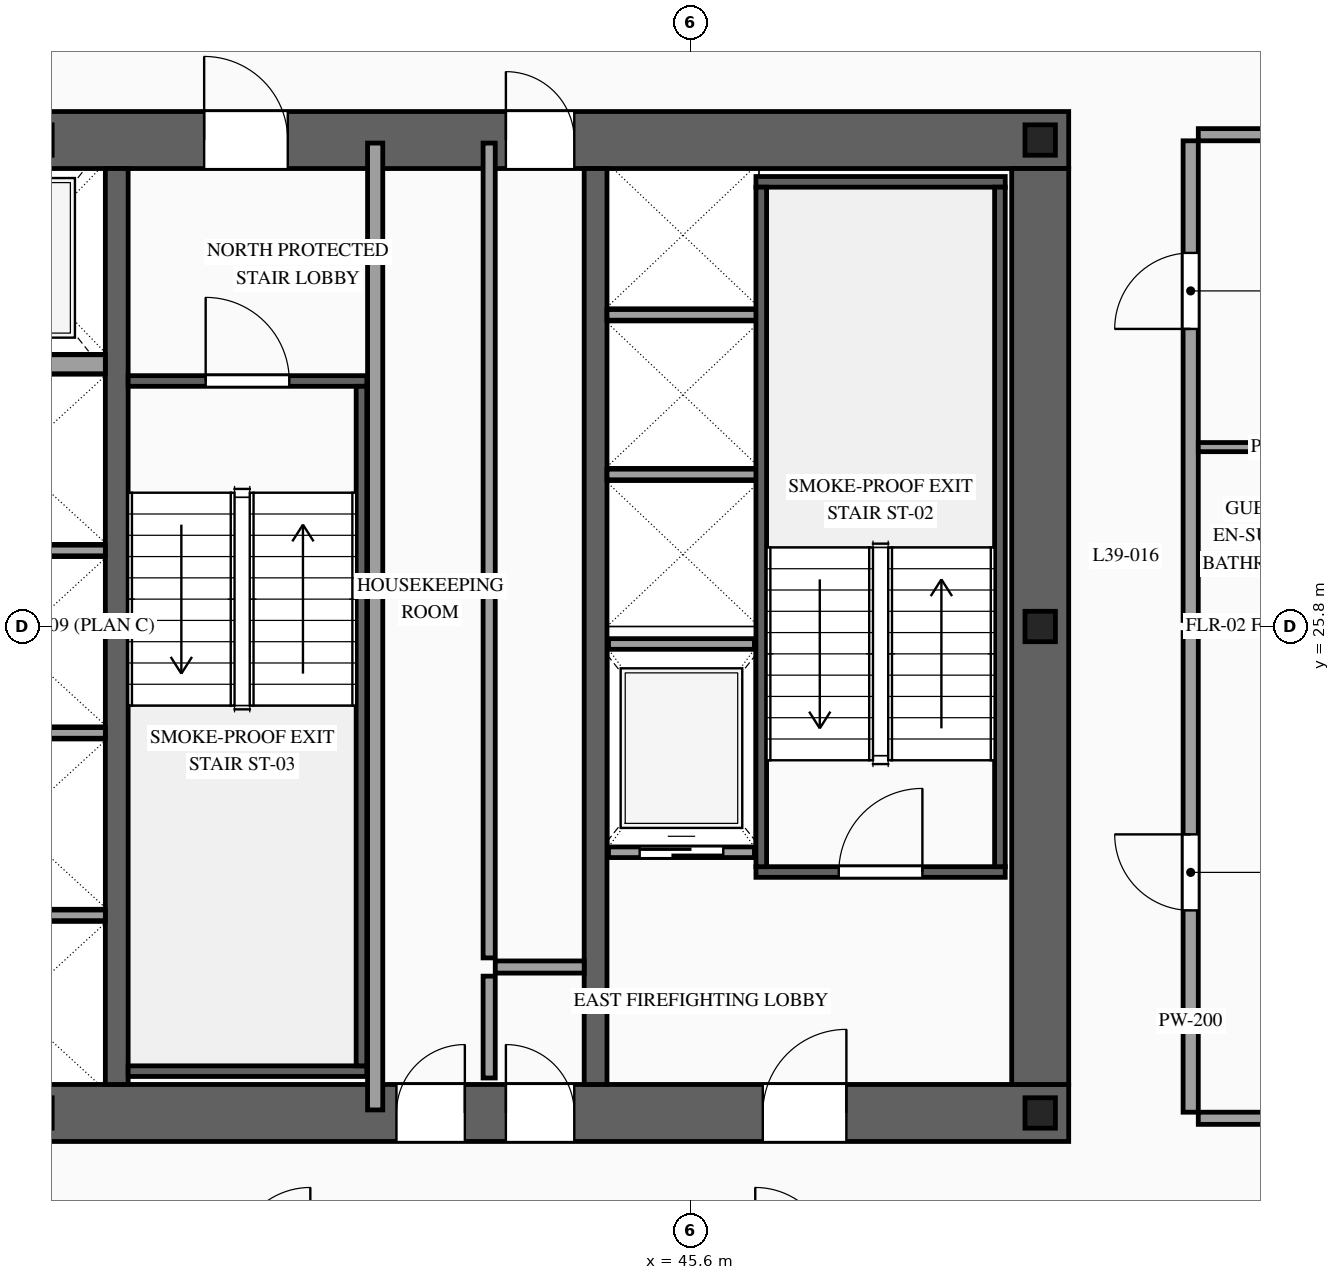
"""IFC4 building model, lengths in metres.
Left out: names, types, materials, properties, quantities, classifications, styles, units other than length and angle.
Written with IfcOpenShell. Run it as: python <this file> out.ifc"""

import sys

from ifc_helpers import new_model, si_unit, direction, frame, frame_2d, origin, origin_2d, place, context, subcontext, project, spatial, rectangle, i_section, extrude, source, transform, mapped, element, fill, save


model = new_model("IFC4")
c1 = context("Model", 3, precision=1e-05, world=origin(), true_north=direction((0.0, 1.0)))
c2 = subcontext(c1, "Body", "Model", "MODEL_VIEW")
j1 = project(units=[si_unit("LENGTHUNIT", "METRE"), si_unit("PLANEANGLEUNIT", "RADIAN")], contexts=[c1])
p1 = place(None, origin())
s1 = spatial("IfcSite", under=j1, at=p1, CompositionType="ELEMENT")
p2 = place(p1, origin())
s2 = spatial("IfcBuilding", under=s1, at=p2, CompositionType="ELEMENT")
p3 = place(p2, frame((0.0, 0.0, 148.8)))
s3 = spatial("IfcBuildingStorey", under=s2, at=p3, CompositionType="ELEMENT", Elevation=148.8)
p4 = place(p3, frame((23.425, 19.4, 0.0), z_axis=(0.0, 0.0, 1.0), x_axis=(1.0, 0.0, 0.0)))
e1 = element("IfcWall", 1, at=p4, inside=s3, PredefinedType="SHEAR", context=c2, shape_type="SweptSolid", body=[
    extrude(rectangle(XDim=27.15, YDim=0.75, at=frame_2d((13.575, 0.0))), origin(), (0.0, 0.0, 1.0), 3.6),
])
p5 = place(p4, frame((2.025, 0.0, 0.0)))
e2 = element("IfcOpeningElement", 2, at=p5, cuts=e1, PredefinedType="OPENING", context=c2, shape_type="SweptSolid", body=[
    extrude(rectangle(XDim=1.1, YDim=2.2, at=frame_2d((0.55, 1.1))), frame((0.0, 0.39, 0.0), z_axis=(0.0, -1.0, 0.0), x_axis=(1.0, 0.0, 0.0)), (0.0, 0.0, 1.0), 0.78),
])
p6 = place(p4, frame((9.925, 0.0, 0.0)))
e3 = element("IfcOpeningElement", 3, at=p6, cuts=e1, PredefinedType="OPENING", context=c2, shape_type="SweptSolid", body=[
    extrude(rectangle(XDim=1.1, YDim=2.2, at=frame_2d((0.55, 1.1))), frame((0.0, 0.39, 0.0), z_axis=(0.0, -1.0, 0.0), x_axis=(1.0, 0.0, 0.0)), (0.0, 0.0, 1.0), 0.78),
])
p7 = place(p4, frame((23.125, 0.0, 0.0)))
e4 = element("IfcOpeningElement", 4, at=p7, cuts=e1, PredefinedType="OPENING", context=c2, shape_type="SweptSolid", body=[
    extrude(rectangle(XDim=1.1, YDim=2.2, at=frame_2d((0.55, 1.1))), frame((0.0, 0.39, 0.0), z_axis=(0.0, -1.0, 0.0), x_axis=(1.0, 0.0, 0.0)), (0.0, 0.0, 1.0), 0.78),
])
p8 = place(p4, frame((19.745, 0.0, 0.0)))
e5 = element("IfcOpeningElement", 5, at=p8, cuts=e1, PredefinedType="OPENING", context=c2, shape_type="SweptSolid", body=[
    extrude(rectangle(XDim=0.9, YDim=2.15, at=frame_2d((0.45, 1.075))), frame((0.0, 0.39, 0.0), z_axis=(0.0, -1.0, 0.0), x_axis=(1.0, 0.0, 0.0)), (0.0, 0.0, 1.0), 0.78),
])
p9 = place(p4, frame((18.305, 0.0, 0.0)))
e6 = element("IfcOpeningElement", 6, at=p9, cuts=e1, PredefinedType="OPENING", context=c2, shape_type="SweptSolid", body=[
    extrude(rectangle(XDim=0.9, YDim=2.15, at=frame_2d((0.45, 1.075))), frame((0.0, 0.39, 0.0), z_axis=(0.0, -1.0, 0.0), x_axis=(1.0, 0.0, 0.0)), (0.0, 0.0, 1.0), 0.78),
])
p10 = place(p3, frame((23.425, 32.2, 0.0), z_axis=(0.0, 0.0, 1.0), x_axis=(1.0, 0.0, 0.0)))
e7 = element("IfcWall", 7, at=p10, inside=s3, PredefinedType="SHEAR", context=c2, shape_type="SweptSolid", body=[
    extrude(rectangle(XDim=27.15, YDim=0.75, at=frame_2d((13.575, 0.0))), origin(), (0.0, 0.0, 1.0), 3.6),
])
p11 = place(p10, frame((4.645, 0.0, 0.0)))
e8 = element("IfcOpeningElement", 8, at=p11, cuts=e7, PredefinedType="OPENING", context=c2, shape_type="SweptSolid", body=[
    extrude(rectangle(XDim=0.9, YDim=2.15, at=frame_2d((0.45, 1.075))), frame((0.0, 0.39, 0.0), z_axis=(0.0, -1.0, 0.0), x_axis=(1.0, 0.0, 0.0)), (0.0, 0.0, 1.0), 0.78),
])
p12 = place(p10, frame((9.925, 0.0, 0.0)))
e9 = element("IfcOpeningElement", 9, at=p12, cuts=e7, PredefinedType="OPENING", context=c2, shape_type="SweptSolid", body=[
    extrude(rectangle(XDim=1.1, YDim=2.2, at=frame_2d((0.55, 1.1))), frame((0.0, 0.39, 0.0), z_axis=(0.0, -1.0, 0.0), x_axis=(1.0, 0.0, 0.0)), (0.0, 0.0, 1.0), 0.78),
])
p13 = place(p10, frame((15.775, 0.0, 0.0)))
e10 = element("IfcOpeningElement", 10, at=p13, cuts=e7, PredefinedType="OPENING", context=c2, shape_type="SweptSolid", body=[
    extrude(rectangle(XDim=1.1, YDim=2.2, at=frame_2d((0.55, 1.1))), frame((0.0, 0.39, 0.0), z_axis=(0.0, -1.0, 0.0), x_axis=(1.0, 0.0, 0.0)), (0.0, 0.0, 1.0), 0.78),
])
p14 = place(p10, frame((19.745, 0.0, 0.0)))
e11 = element("IfcOpeningElement", 11, at=p14, cuts=e7, PredefinedType="OPENING", context=c2, shape_type="SweptSolid", body=[
    extrude(rectangle(XDim=0.9, YDim=2.15, at=frame_2d((0.45, 1.075))), frame((0.0, 0.39, 0.0), z_axis=(0.0, -1.0, 0.0), x_axis=(1.0, 0.0, 0.0)), (0.0, 0.0, 1.0), 0.78),
])
m1 = source(origin(), c2, "Body", "SweptSolid", [
    extrude(rectangle(XDim=12.05, YDim=0.75, at=frame_2d((6.025, 0.0))), origin(), (0.0, 0.0, 1.0), 3.6),
])
p15 = place(p3, frame((50.2, 19.775, 0.0), z_axis=(0.0, 0.0, 1.0), x_axis=(0.0, 1.0, 0.0)))
e12 = element("IfcWall", 12, at=p15, inside=s3, PredefinedType="SHEAR", context=c2, shape_type="MappedRepresentation", body=[
    mapped(m1, transform((0.0, 0.0, 0.0), scale=1.0)),
])
m2 = source(origin(), c2, "Body", "SweptSolid", [
    extrude(rectangle(XDim=12.05, YDim=0.3, at=frame_2d((6.025, 0.0))), origin(), (0.0, 0.0, 1.0), 3.6),
])
for number, where, z_axis, x_axis in (
    (13, (38.05, 19.775, 0.0), (0.0, 0.0, 1.0), (0.0, 1.0, 0.0)),
    (14, (44.35, 19.775, 0.0), (0.0, 0.0, 1.0), (0.0, 1.0, 0.0)),
):
    element("IfcWall", number, at=place(p3, frame(where, z_axis=z_axis, x_axis=x_axis)), inside=s3, PredefinedType="SOLIDWALL", context=c2, shape_type="MappedRepresentation", body=[
        mapped(m2, transform((0.0, 0.0, 0.0), scale=1.0)),
    ])
m3 = source(origin(), c2, "Body", "SweptSolid", [
    extrude(i_section(OverallWidth=0.4, OverallDepth=0.4, WebThickness=0.013, FlangeThickness=0.021, at=origin_2d()), origin(), (0.0, 0.0, 1.0), 3.6),
])
for number, where, z_axis, x_axis in (
    (15, (50.2, 19.4, 0.0), (0.0, 0.0, 1.0), (1.0, 0.0, 0.0)),
    (16, (50.2, 25.8, 0.0), (0.0, 0.0, 1.0), (1.0, 0.0, 0.0)),
    (17, (50.2, 32.2, 0.0), (0.0, 0.0, 1.0), (1.0, 0.0, 0.0)),
):
    element("IfcColumn", number, at=place(p3, frame(where, z_axis=z_axis, x_axis=x_axis)), inside=s3, PredefinedType="COLUMN", context=c2, shape_type="MappedRepresentation", body=[
        mapped(m3, transform((0.0, 0.0, 0.0), scale=1.0)),
    ])
p16 = place(p3, frame((44.52, 22.83, 0.0), z_axis=(0.0, 0.0, 1.0), x_axis=(1.0, 0.0, 0.0)))
e18 = element("IfcWall", 18, at=p16, inside=s3, PredefinedType="SOLIDWALL", context=c2, shape_type="SweptSolid", body=[
    extrude(rectangle(XDim=1.92, YDim=0.14, at=frame_2d((0.96, 0.0))), origin(), (0.0, 0.0, 1.0), 3.38),
])
p17 = place(p16, frame((0.41, 0.0, 0.0)))
e19 = element("IfcOpeningElement", 19, at=p17, cuts=e18, PredefinedType="OPENING", context=c2, shape_type="SweptSolid", body=[
    extrude(rectangle(XDim=1.1, YDim=2.2, at=frame_2d((0.55, 1.1))), frame((0.0, 0.085, 0.0), z_axis=(0.0, -1.0, 0.0), x_axis=(1.0, 0.0, 0.0)), (0.0, 0.0, 1.0), 0.17),
])
m4 = source(origin(), c2, "Body", "SweptSolid", [
    extrude(rectangle(XDim=1.92, YDim=0.14, at=frame_2d((0.96, 0.0))), origin(), (0.0, 0.0, 1.0), 3.38),
])
p18 = place(p3, frame((44.52, 25.57, 0.0), z_axis=(0.0, 0.0, 1.0), x_axis=(1.0, 0.0, 0.0)))
e20 = element("IfcWall", 20, at=p18, inside=s3, PredefinedType="SOLIDWALL", context=c2, shape_type="MappedRepresentation", body=[
    mapped(m4, transform((0.0, 0.0, 0.0), scale=1.0)),
])
m5 = source(origin(), c2, "Body", "SweptSolid", [
    extrude(rectangle(XDim=2.4, YDim=0.14, at=frame_2d((1.2, 0.0))), origin(), (0.0, 0.0, 1.0), 3.38),
])
for number, where, z_axis, x_axis in (
    (21, (35.5, 22.0, 0.0), (0.0, 0.0, 1.0), (1.0, 0.0, 0.0)),
    (22, (35.5, 24.4, 0.0), (0.0, 0.0, 1.0), (1.0, 0.0, 0.0)),
    (23, (35.5, 26.8, 0.0), (0.0, 0.0, 1.0), (1.0, 0.0, 0.0)),
):
    element("IfcWall", number, at=place(p3, frame(where, z_axis=z_axis, x_axis=x_axis)), inside=s3, PredefinedType="SOLIDWALL", context=c2, shape_type="MappedRepresentation", body=[
        mapped(m5, transform((0.0, 0.0, 0.0), scale=1.0)),
    ])
m6 = source(origin(), c2, "Body", "SweptSolid", [
    extrude(rectangle(XDim=2.4, YDim=0.25, at=frame_2d((1.2, 0.0))), origin(), (0.0, 0.0, 1.0), 3.38),
])
p19 = place(p3, frame((35.5, 29.25, 0.0), z_axis=(0.0, 0.0, 1.0), x_axis=(1.0, 0.0, 0.0)))
e24 = element("IfcWall", 24, at=p19, inside=s3, PredefinedType="SOLIDWALL", context=c2, shape_type="MappedRepresentation", body=[
    mapped(m6, transform((0.0, 0.0, 0.0), scale=1.0)),
])
m7 = source(origin(), c2, "Body", "SweptSolid", [
    extrude(rectangle(XDim=2.0, YDim=0.14, at=frame_2d((1.0, 0.0))), origin(), (0.0, 0.0, 1.0), 3.38),
])
for number, where, z_axis, x_axis in (
    (25, (44.5, 27.8, 0.0), (0.0, 0.0, 1.0), (1.0, 0.0, 0.0)),
    (26, (44.5, 29.9, 0.0), (0.0, 0.0, 1.0), (1.0, 0.0, 0.0)),
):
    element("IfcWall", number, at=place(p3, frame(where, z_axis=z_axis, x_axis=x_axis)), inside=s3, PredefinedType="SOLIDWALL", context=c2, shape_type="MappedRepresentation", body=[
        mapped(m7, transform((0.0, 0.0, 0.0), scale=1.0)),
    ])
p20 = place(p3, frame((46.46, 22.57, 0.0), z_axis=(0.0, 0.0, 1.0), x_axis=(1.0, 0.0, 0.0)))
e27 = element("IfcWall", 27, at=p20, inside=s3, PredefinedType="SOLIDWALL", context=c2, shape_type="SweptSolid", body=[
    extrude(rectangle(XDim=3.28, YDim=0.14, at=frame_2d((1.64, 0.0))), origin(), (0.0, 0.0, 1.0), 3.38),
])
p21 = place(p20, frame((1.09, 0.0, 0.0)))
e28 = element("IfcOpeningElement", 28, at=p21, cuts=e27, PredefinedType="OPENING", context=c2, shape_type="SweptSolid", body=[
    extrude(rectangle(XDim=1.1, YDim=2.2, at=frame_2d((0.55, 1.1))), frame((0.0, 0.085, 0.0), z_axis=(0.0, -1.0, 0.0), x_axis=(1.0, 0.0, 0.0)), (0.0, 0.0, 1.0), 0.17),
])
m8 = source(origin(), c2, "Body", "SweptSolid", [
    extrude(rectangle(XDim=3.28, YDim=0.14, at=frame_2d((1.64, 0.0))), origin(), (0.0, 0.0, 1.0), 3.38),
])
p22 = place(p3, frame((46.46, 31.65, 0.0), z_axis=(0.0, 0.0, 1.0), x_axis=(1.0, 0.0, 0.0)))
e29 = element("IfcWall", 29, at=p22, inside=s3, PredefinedType="SOLIDWALL", context=c2, shape_type="MappedRepresentation", body=[
    mapped(m8, transform((0.0, 0.0, 0.0), scale=1.0)),
])
m9 = source(origin(), c2, "Body", "SweptSolid", [
    extrude(rectangle(XDim=8.94, YDim=0.14, at=frame_2d((4.47, 0.0))), origin(), (0.0, 0.0, 1.0), 3.38),
])
for number, where, z_axis, x_axis in (
    (30, (46.53, 22.64, 0.0), (0.0, 0.0, 1.0), (0.0, 1.0, 0.0)),
    (31, (49.67, 22.64, 0.0), (0.0, 0.0, 1.0), (0.0, 1.0, 0.0)),
):
    element("IfcWall", number, at=place(p3, frame(where, z_axis=z_axis, x_axis=x_axis)), inside=s3, PredefinedType="SOLIDWALL", context=c2, shape_type="MappedRepresentation", body=[
        mapped(m9, transform((0.0, 0.0, 0.0), scale=1.0)),
    ])
p23 = place(p3, frame((38.2, 29.03, 0.0), z_axis=(0.0, 0.0, 1.0), x_axis=(1.0, 0.0, 0.0)))
e32 = element("IfcWall", 32, at=p23, inside=s3, PredefinedType="SOLIDWALL", context=c2, shape_type="SweptSolid", body=[
    extrude(rectangle(XDim=3.14, YDim=0.14, at=frame_2d((1.57, 0.0))), origin(), (0.0, 0.0, 1.0), 3.38),
])
p24 = place(p23, frame((1.02, 0.0, 0.0)))
e33 = element("IfcOpeningElement", 33, at=p24, cuts=e32, PredefinedType="OPENING", context=c2, shape_type="SweptSolid", body=[
    extrude(rectangle(XDim=1.1, YDim=2.2, at=frame_2d((0.55, 1.1))), frame((0.0, 0.085, 0.0), z_axis=(0.0, -1.0, 0.0), x_axis=(1.0, 0.0, 0.0)), (0.0, 0.0, 1.0), 0.17),
])
m10 = source(origin(), c2, "Body", "SweptSolid", [
    extrude(rectangle(XDim=3.14, YDim=0.14, at=frame_2d((1.57, 0.0))), origin(), (0.0, 0.0, 1.0), 3.38),
])
p25 = place(p3, frame((38.2, 19.95, 0.0), z_axis=(0.0, 0.0, 1.0), x_axis=(1.0, 0.0, 0.0)))
e34 = element("IfcWall", 34, at=p25, inside=s3, PredefinedType="SOLIDWALL", context=c2, shape_type="MappedRepresentation", body=[
    mapped(m10, transform((0.0, 0.0, 0.0), scale=1.0)),
])
m11 = source(origin(), c2, "Body", "SweptSolid", [
    extrude(rectangle(XDim=8.94, YDim=0.14, at=frame_2d((4.47, 0.0))), origin(), (0.0, 0.0, 1.0), 3.38),
])
p26 = place(p3, frame((41.27, 20.02, 0.0), z_axis=(0.0, 0.0, 1.0), x_axis=(0.0, 1.0, 0.0)))
e35 = element("IfcWall", 35, at=p26, inside=s3, PredefinedType="SOLIDWALL", context=c2, shape_type="MappedRepresentation", body=[
    mapped(m11, transform((0.0, 0.0, 0.0), scale=1.0)),
])
m12 = source(origin(), c2, "Body", "SweptSolid", [
    extrude(rectangle(XDim=1.34, YDim=0.16, at=frame_2d((0.67, 0.0))), origin(), (0.0, 0.0, 1.0), 3.38),
])
p27 = place(p3, frame((42.95, 19.86, 0.0), z_axis=(0.0, 0.0, 1.0), x_axis=(0.0, 1.0, 0.0)))
e36 = element("IfcWall", 36, at=p27, inside=s3, PredefinedType="PARTITIONING", context=c2, shape_type="MappedRepresentation", body=[
    mapped(m12, transform((0.0, 0.0, 0.0), scale=1.0)),
])
m13 = source(origin(), c2, "Body", "SweptSolid", [
    extrude(rectangle(XDim=1.17, YDim=0.16, at=frame_2d((0.585, 0.0))), origin(), (0.0, 0.0, 1.0), 3.38),
])
p28 = place(p3, frame((43.03, 21.32, 0.0), z_axis=(0.0, 0.0, 1.0), x_axis=(1.0, 0.0, 0.0)))
e37 = element("IfcWall", 37, at=p28, inside=s3, PredefinedType="PARTITIONING", context=c2, shape_type="MappedRepresentation", body=[
    mapped(m13, transform((0.0, 0.0, 0.0), scale=1.0)),
])
m14 = source(origin(), c2, "Body", "SweptSolid", [
    extrude(rectangle(XDim=12.72, YDim=0.2, at=frame_2d((6.36, 0.0))), origin(), (0.0, 0.0, 1.0), 3.38),
])
p29 = place(p3, frame((41.45, 19.44, 0.0), z_axis=(0.0, 0.0, 1.0), x_axis=(0.0, 1.0, 0.0)))
e38 = element("IfcWall", 38, at=p29, inside=s3, PredefinedType="PARTITIONING", context=c2, shape_type="MappedRepresentation", body=[
    mapped(m14, transform((0.0, 0.0, 0.0), scale=1.0)),
])
m15 = source(origin(), c2, "Body", "SweptSolid", [
    extrude(rectangle(XDim=10.72, YDim=0.16, at=frame_2d((5.36, 0.0))), origin(), (0.0, 0.0, 1.0), 3.38),
])
p30 = place(p3, frame((42.95, 21.44, 0.0), z_axis=(0.0, 0.0, 1.0), x_axis=(0.0, 1.0, 0.0)))
e39 = element("IfcWall", 39, at=p30, inside=s3, PredefinedType="PARTITIONING", context=c2, shape_type="MappedRepresentation", body=[
    mapped(m15, transform((0.0, 0.0, 0.0), scale=1.0)),
])
p31 = place(p3, frame((52.18, 19.41, 0.0), z_axis=(0.0, 0.0, 1.0), x_axis=(0.0, 1.0, 0.0)))
e40 = element("IfcWall", 40, at=p31, inside=s3, PredefinedType="PARTITIONING", context=c2, shape_type="SweptSolid", body=[
    extrude(rectangle(XDim=6.31, YDim=0.2, at=frame_2d((3.155, 0.0))), origin(), (0.0, 0.0, 1.0), 3.38),
])
p32 = place(p31, frame((2.655, 0.0, 0.0)))
e41 = element("IfcOpeningElement", 41, at=p32, cuts=e40, PredefinedType="OPENING", context=c2, shape_type="SweptSolid", body=[
    extrude(rectangle(XDim=1.0, YDim=2.2, at=frame_2d((0.5, 1.1))), frame((0.0, 0.115, 0.0), z_axis=(0.0, -1.0, 0.0), x_axis=(1.0, 0.0, 0.0)), (0.0, 0.0, 1.0), 0.23),
])
m16 = source(origin(), c2, "Body", "SweptSolid", [
    extrude(rectangle(XDim=8.17, YDim=0.16, at=frame_2d((4.085, 0.0))), origin(), (0.0, 0.0, 1.0), 2.675),
])
p33 = place(p3, frame((52.28, 25.8, 0.0), z_axis=(0.0, 0.0, 1.0), x_axis=(1.0, 0.0, 0.0)))
e42 = element("IfcWall", 42, at=p33, inside=s3, PredefinedType="PARTITIONING", context=c2, shape_type="MappedRepresentation", body=[
    mapped(m16, transform((0.0, 0.0, 0.0), scale=1.0)),
])
m17 = source(origin(), c2, "Body", "SweptSolid", [
    extrude(rectangle(XDim=8.17, YDim=0.16, at=frame_2d((4.085, 0.0))), origin(), (0.0, 0.0, 1.0), 2.875),
])
p34 = place(p3, frame((52.28, 19.33, 0.0), z_axis=(0.0, 0.0, 1.0), x_axis=(1.0, 0.0, 0.0)))
e43 = element("IfcWall", 43, at=p34, inside=s3, PredefinedType="PARTITIONING", context=c2, shape_type="MappedRepresentation", body=[
    mapped(m17, transform((0.0, 0.0, 0.0), scale=1.0)),
])
p35 = place(p3, frame((52.18, 25.88, 0.0), z_axis=(0.0, 0.0, 1.0), x_axis=(0.0, 1.0, 0.0)))
e44 = element("IfcWall", 44, at=p35, inside=s3, PredefinedType="PARTITIONING", context=c2, shape_type="SweptSolid", body=[
    extrude(rectangle(XDim=6.31, YDim=0.2, at=frame_2d((3.155, 0.0))), origin(), (0.0, 0.0, 1.0), 3.38),
])
p36 = place(p35, frame((3.835, 0.0, 0.0)))
e45 = element("IfcOpeningElement", 45, at=p36, cuts=e44, PredefinedType="OPENING", context=c2, shape_type="SweptSolid", body=[
    extrude(rectangle(XDim=1.0, YDim=2.2, at=frame_2d((0.5, 1.1))), frame((0.0, 0.115, 0.0), z_axis=(0.0, -1.0, 0.0), x_axis=(1.0, 0.0, 0.0)), (0.0, 0.0, 1.0), 0.23),
])
p37 = place(p3, frame((52.28, 32.27, 0.0), z_axis=(0.0, 0.0, 1.0), x_axis=(1.0, 0.0, 0.0)))
e46 = element("IfcWall", 46, at=p37, inside=s3, PredefinedType="PARTITIONING", context=c2, shape_type="MappedRepresentation", body=[
    mapped(m17, transform((0.0, 0.0, 0.0), scale=1.0)),
])
m18 = source(origin(), c2, "Body", "SweptSolid", [
    extrude(rectangle(XDim=2.22, YDim=0.12, at=frame_2d((1.11, 0.0))), origin(), (0.0, 0.0, 1.0), 3.38),
])
p38 = place(p3, frame((52.28, 28.16, 0.0), z_axis=(0.0, 0.0, 1.0), x_axis=(1.0, 0.0, 0.0)))
e47 = element("IfcWall", 47, at=p38, inside=s3, PredefinedType="PARTITIONING", context=c2, shape_type="MappedRepresentation", body=[
    mapped(m18, transform((0.0, 0.0, 0.0), scale=1.0)),
])
m19 = source(origin(), c2, "Body", "SweptSolid", [
    extrude(rectangle(XDim=1.1, YDim=2.2, at=frame_2d((0.55, 1.1))), frame((0.0, 0.025, 0.0), z_axis=(0.0, -1.0, 0.0), x_axis=(1.0, 0.0, 0.0)), (0.0, 0.0, 1.0), 0.05),
])
p39 = place(p17, origin())
e48 = element("IfcDoor", 48, at=p39, inside=s3, OperationType="SLIDING_TO_RIGHT", PredefinedType="DOOR", context=c2, shape_type="MappedRepresentation", body=[
    mapped(m19, transform((0.0, 0.0, 0.0), scale=1.0)),
])
fill(e19, e48)
m20 = source(origin(), c2, "Body", "SweptSolid", [
    extrude(rectangle(XDim=1.1, YDim=2.2, at=frame_2d((0.55, 1.1))), frame((0.0, 0.025, 0.0), z_axis=(0.0, -1.0, 0.0), x_axis=(1.0, 0.0, 0.0)), (0.0, 0.0, 1.0), 0.05),
])
p40 = place(p21, origin())
e49 = element("IfcDoor", 49, at=p40, inside=s3, OperationType="SINGLE_SWING_RIGHT", PredefinedType="DOOR", context=c2, shape_type="MappedRepresentation", body=[
    mapped(m20, transform((0.0, 0.0, 0.0), scale=1.0)),
])
fill(e28, e49)
p41 = place(p24, origin())
e50 = element("IfcDoor", 50, at=p41, inside=s3, OperationType="SINGLE_SWING_LEFT", PredefinedType="DOOR", context=c2, shape_type="MappedRepresentation", body=[
    mapped(m20, transform((0.0, 0.0, 0.0), scale=1.0)),
])
fill(e33, e50)
p42 = place(p7, origin())
e51 = element("IfcDoor", 51, at=p42, inside=s3, OperationType="SINGLE_SWING_RIGHT", PredefinedType="DOOR", context=c2, shape_type="MappedRepresentation", body=[
    mapped(m20, transform((0.0, 0.0, 0.0), scale=1.0)),
])
fill(e4, e51)
p43 = place(p13, origin())
e52 = element("IfcDoor", 52, at=p43, inside=s3, OperationType="SINGLE_SWING_LEFT", PredefinedType="DOOR", context=c2, shape_type="MappedRepresentation", body=[
    mapped(m20, transform((0.0, 0.0, 0.0), scale=1.0)),
])
fill(e10, e52)
m21 = source(origin(), c2, "Body", "SweptSolid", [
    extrude(rectangle(XDim=0.9, YDim=2.15, at=frame_2d((0.45, 1.075))), frame((0.0, 0.025, 0.0), z_axis=(0.0, -1.0, 0.0), x_axis=(1.0, 0.0, 0.0)), (0.0, 0.0, 1.0), 0.05),
])
p44 = place(p8, origin())
e53 = element("IfcDoor", 53, at=p44, inside=s3, OperationType="SINGLE_SWING_LEFT", PredefinedType="DOOR", context=c2, shape_type="MappedRepresentation", body=[
    mapped(m21, transform((0.0, 0.0, 0.0), scale=1.0)),
])
fill(e5, e53)
p45 = place(p9, origin())
e54 = element("IfcDoor", 54, at=p45, inside=s3, OperationType="SINGLE_SWING_RIGHT", PredefinedType="DOOR", context=c2, shape_type="MappedRepresentation", body=[
    mapped(m21, transform((0.0, 0.0, 0.0), scale=1.0)),
])
fill(e6, e54)
p46 = place(p14, origin())
e55 = element("IfcDoor", 55, at=p46, inside=s3, OperationType="SINGLE_SWING_LEFT", PredefinedType="DOOR", context=c2, shape_type="MappedRepresentation", body=[
    mapped(m21, transform((0.0, 0.0, 0.0), scale=1.0)),
])
fill(e11, e55)
m22 = source(origin(), c2, "Body", "SweptSolid", [
    extrude(rectangle(XDim=1.0, YDim=2.2, at=frame_2d((0.5, 1.1))), frame((0.0, 0.025, 0.0), z_axis=(0.0, -1.0, 0.0), x_axis=(1.0, 0.0, 0.0)), (0.0, 0.0, 1.0), 0.05),
])
p47 = place(p32, origin())
e56 = element("IfcDoor", 56, at=p47, inside=s3, OperationType="SINGLE_SWING_RIGHT", PredefinedType="DOOR", context=c2, shape_type="MappedRepresentation", body=[
    mapped(m22, transform((0.0, 0.0, 0.0), scale=1.0)),
])
fill(e41, e56)
p48 = place(p36, origin())
e57 = element("IfcDoor", 57, at=p48, inside=s3, OperationType="SINGLE_SWING_LEFT", PredefinedType="DOOR", context=c2, shape_type="MappedRepresentation", body=[
    mapped(m22, transform((0.0, 0.0, 0.0), scale=1.0)),
])
fill(e45, e57)
save(model, sys.argv[1])
